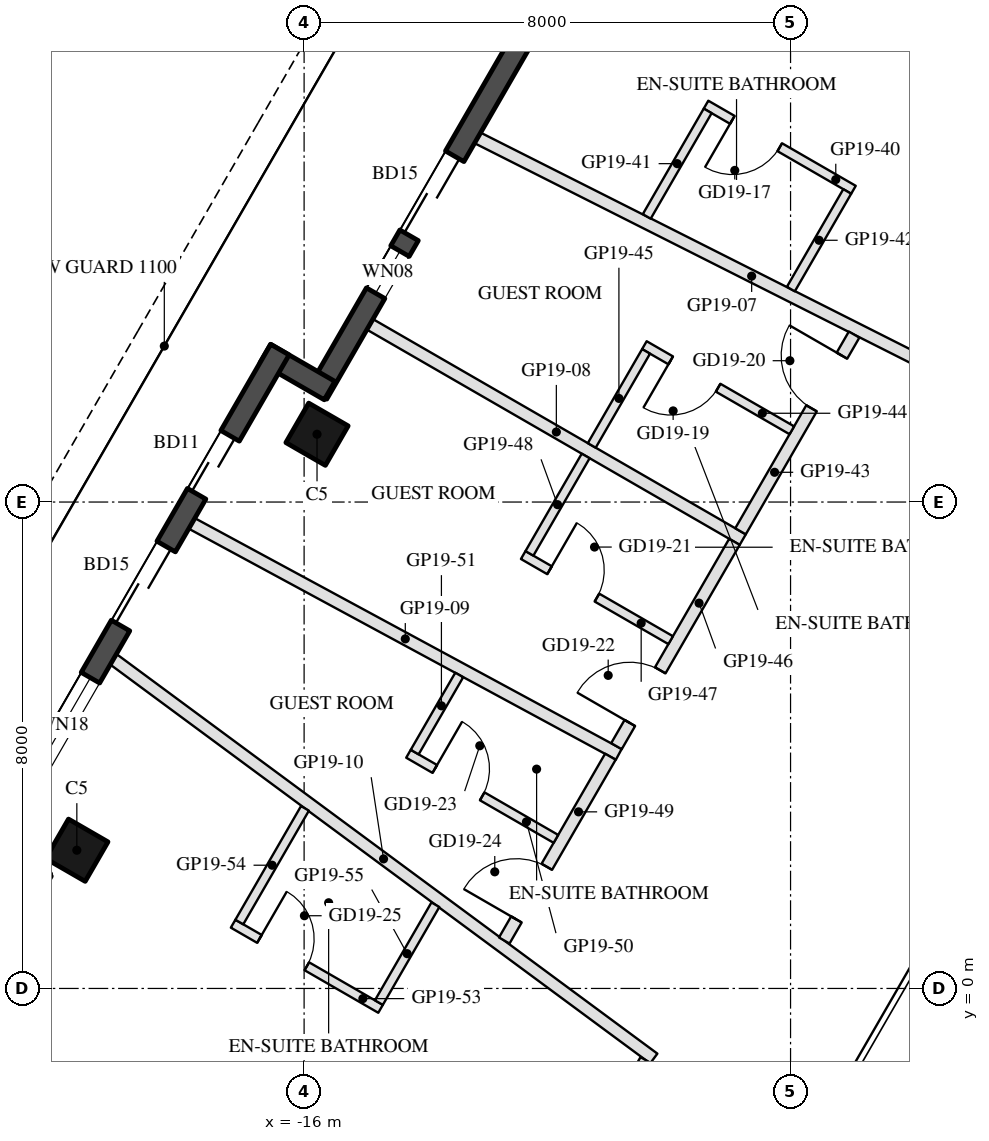
"""IFC4 building model, lengths in metres.
Left out: names, types, materials, properties, quantities, classifications, styles, units other than length and angle.
Written with IfcOpenShell. Run it as: python <this file> out.ifc"""

import sys

from ifc_helpers import new_model, si_unit, direction, frame, frame_2d, origin, origin_2d, place, context, subcontext, project, spatial, rectangle, hollow_rectangle, extrude, element, fill, save


model = new_model("IFC4")
c1 = context("Model", 3, precision=1e-05, world=origin(), true_north=direction((0.0, 1.0)))
c2 = subcontext(c1, "Body", "Model", "MODEL_VIEW")
j1 = project(units=[si_unit("LENGTHUNIT", "METRE"), si_unit("PLANEANGLEUNIT", "RADIAN")], contexts=[c1])
p1 = place(None, origin())
s1 = spatial("IfcSite", under=j1, at=p1, CompositionType="ELEMENT")
p2 = place(p1, origin())
s2 = spatial("IfcBuilding", under=s1, at=p2, CompositionType="ELEMENT")
p3 = place(p2, frame((0.0, 0.0, 202.1)))
s3 = spatial("IfcBuildingStorey", under=s2, at=p3, CompositionType="ELEMENT", Elevation=202.1)
for number, where, z_axis, x_axis in (
    (1, (-15.788, 9.115, 0.0), (0.0, 0.0, 1.0), (0.5, 0.866, 0.0)),
    (2, (-19.738, 2.273, 0.0), (0.0, 0.0, 1.0), (0.5, 0.866, 0.0)),
):
    element("IfcColumn", number, at=place(p3, frame(where, z_axis=z_axis, x_axis=x_axis)), inside=s3, PredefinedType="COLUMN", context=c2, shape_type="SweptSolid", body=[
        extrude(hollow_rectangle(XDim=0.75, YDim=0.75, WallThickness=0.035, at=origin_2d()), origin(), (0.0, 0.0, 1.0), 3.7),
    ])
p4 = place(p3, frame((-13.413, 16.029, 0.0), z_axis=(0.0, 0.0, 1.0), x_axis=(0.866005645448, -0.500034220881, 0.0)))
e3 = element("IfcWall", 3, at=p4, inside=s3, PredefinedType="SOLIDWALL", context=c2, shape_type="SweptSolid", body=[
    extrude(rectangle(XDim=1.22, YDim=0.35, at=frame_2d((0.61, 0.0))), origin(), (0.0, 0.0, 1.0), 3.55),
])
p5 = place(p3, frame((-12.409, 15.617, 0.0), z_axis=(0.0, 0.0, 1.0), x_axis=(-0.500003597184, -0.866023326939, 0.0)))
e4 = element("IfcWall", 4, at=p5, inside=s3, PredefinedType="SOLIDWALL", context=c2, shape_type="SweptSolid", body=[
    extrude(rectangle(XDim=6.74, YDim=0.35, at=frame_2d((3.37, 0.0))), origin(), (0.0, 0.0, 1.0), 3.55),
])
p6 = place(p5, frame((2.229, 0.0, 0.0)))
e5 = element("IfcOpeningElement", 5, at=p6, cuts=e4, PredefinedType="OPENING", context=c2, shape_type="SweptSolid", body=[
    extrude(rectangle(XDim=1.5, YDim=2.4, at=frame_2d((0.75, 1.2))), frame((0.0, 0.185, 0.0), z_axis=(0.0, -1.0, 0.0), x_axis=(1.0, 0.0, 0.0)), (0.0, 0.0, 1.0), 0.37),
])
p7 = place(p5, frame((4.029, 0.0, 0.3)))
e6 = element("IfcOpeningElement", 6, at=p7, cuts=e4, PredefinedType="OPENING", context=c2, shape_type="SweptSolid", body=[
    extrude(rectangle(XDim=0.8, YDim=2.65, at=frame_2d((0.4, 1.325))), frame((0.0, 0.185, 0.0), z_axis=(0.0, -1.0, 0.0), x_axis=(1.0, 0.0, 0.0)), (0.0, 0.0, 1.0), 0.37),
])
p8 = place(p3, frame((-15.581, 9.833, 0.0), z_axis=(0.0, 0.0, 1.0), x_axis=(-0.866055662726, 0.499947586314, 0.0)))
e7 = element("IfcWall", 7, at=p8, inside=s3, PredefinedType="SOLIDWALL", context=c2, shape_type="SweptSolid", body=[
    extrude(rectangle(XDim=1.22, YDim=0.35, at=frame_2d((0.61, 0.0))), origin(), (0.0, 0.0, 1.0), 3.55),
])
p9 = place(p3, frame((-16.398, 10.507, 0.0), z_axis=(0.0, 0.0, 1.0), x_axis=(-0.499999142773, -0.866025898704, 0.0)))
e8 = element("IfcWall", 8, at=p9, inside=s3, PredefinedType="SOLIDWALL", context=c2, shape_type="SweptSolid", body=[
    extrude(rectangle(XDim=9.7, YDim=0.35, at=frame_2d((4.85, 0.0))), origin(), (0.0, 0.0, 1.0), 3.55),
])
p10 = place(p9, frame((1.638, 0.0, 0.0)))
e9 = element("IfcOpeningElement", 9, at=p10, cuts=e8, PredefinedType="OPENING", context=c2, shape_type="SweptSolid", body=[
    extrude(rectangle(XDim=1.1, YDim=2.4, at=frame_2d((0.55, 1.2))), frame((0.0, 0.185, 0.0), z_axis=(0.0, -1.0, 0.0), x_axis=(1.0, 0.0, 0.0)), (0.0, 0.0, 1.0), 0.37),
])
p11 = place(p9, frame((3.74, 0.0, 0.0)))
e10 = element("IfcOpeningElement", 10, at=p11, cuts=e8, PredefinedType="OPENING", context=c2, shape_type="SweptSolid", body=[
    extrude(rectangle(XDim=1.5, YDim=2.4, at=frame_2d((0.75, 1.2))), frame((0.0, 0.185, 0.0), z_axis=(0.0, -1.0, 0.0), x_axis=(1.0, 0.0, 0.0)), (0.0, 0.0, 1.0), 0.37),
])
p12 = place(p9, frame((6.231, 0.0, 0.3)))
e11 = element("IfcOpeningElement", 11, at=p12, cuts=e8, PredefinedType="OPENING", context=c2, shape_type="SweptSolid", body=[
    extrude(rectangle(XDim=1.8, YDim=2.65, at=frame_2d((0.9, 1.325))), frame((0.0, 0.185, 0.0), z_axis=(0.0, -1.0, 0.0), x_axis=(1.0, 0.0, 0.0)), (0.0, 0.0, 1.0), 0.37),
])
p13 = place(p3, frame((-13.147, 13.989, 0.0), z_axis=(0.0, 0.0, 1.0), x_axis=(0.892898572595, -0.450257858408, 0.0)))
e12 = element("IfcWall", 12, at=p13, inside=s3, PredefinedType="PARTITIONING", context=c2, shape_type="SweptSolid", body=[
    extrude(rectangle(XDim=10.096, YDim=0.2, at=frame_2d((5.048, 0.0))), origin(), (0.0, 0.0, 1.0), 3.06),
])
p14 = place(p3, frame((-14.917, 10.922, 0.0), z_axis=(0.0, 0.0, 1.0), x_axis=(0.866019052629, -0.500011000363, 0.0)))
e13 = element("IfcWall", 13, at=p14, inside=s3, PredefinedType="PARTITIONING", context=c2, shape_type="SweptSolid", body=[
    extrude(rectangle(XDim=7.08, YDim=0.2, at=frame_2d((3.54, 0.0))), origin(), (0.0, 0.0, 1.0), 3.06),
])
p15 = place(p3, frame((-17.847, 7.648, 0.0), z_axis=(0.0, 0.0, 1.0), x_axis=(0.879604495132, -0.475705720109, 0.0)))
e14 = element("IfcWall", 14, at=p15, inside=s3, PredefinedType="PARTITIONING", context=c2, shape_type="SweptSolid", body=[
    extrude(rectangle(XDim=7.983, YDim=0.2, at=frame_2d((3.992, 0.0))), origin(), (0.0, 0.0, 1.0), 3.06),
])
p16 = place(p3, frame((-19.137, 5.414, 0.0), z_axis=(0.0, 0.0, 1.0), x_axis=(0.804306065669, -0.594215241077, 0.0)))
e15 = element("IfcWall", 15, at=p16, inside=s3, PredefinedType="PARTITIONING", context=c2, shape_type="SweptSolid", body=[
    extrude(rectangle(XDim=11.05, YDim=0.2, at=frame_2d((5.525, 0.0))), origin(), (0.0, 0.0, 1.0), 3.06),
])
p17 = place(p3, frame((-6.965, 13.136, 0.0), z_axis=(0.0, 0.0, 1.0), x_axis=(-0.866034573852, 0.49998411664, 0.0)))
e16 = element("IfcWall", 16, at=p17, inside=s3, PredefinedType="PARTITIONING", context=c2, shape_type="SweptSolid", body=[
    extrude(rectangle(XDim=2.8, YDim=0.15, at=frame_2d((1.4, 0.0))), origin(), (0.0, 0.0, 1.0), 2.95),
])
p18 = place(p17, frame((1.4, 0.0, 0.0)))
e17 = element("IfcOpeningElement", 17, at=p18, cuts=e16, PredefinedType="OPENING", context=c2, shape_type="SweptSolid", body=[
    extrude(rectangle(XDim=0.9, YDim=2.1, at=frame_2d((0.45, 1.05))), frame((0.0, 0.085, 0.0), z_axis=(0.0, -1.0, 0.0), x_axis=(1.0, 0.0, 0.0)), (0.0, 0.0, 1.0), 0.17),
])
p19 = place(p3, frame((-9.363, 14.433, 0.0), z_axis=(0.0, 0.0, 1.0), x_axis=(-0.500056363668, -0.86599285976, 0.0)))
e18 = element("IfcWall", 18, at=p19, inside=s3, PredefinedType="PARTITIONING", context=c2, shape_type="SweptSolid", body=[
    extrude(rectangle(XDim=2.004, YDim=0.15, at=frame_2d((1.002, 0.0))), origin(), (0.0, 0.0, 1.0), 2.95),
])
p20 = place(p3, frame((-7.068, 13.108, 0.0), z_axis=(0.0, 0.0, 1.0), x_axis=(-0.4999770169, -0.866038672677, 0.0)))
e19 = element("IfcWall", 19, at=p20, inside=s3, PredefinedType="PARTITIONING", context=c2, shape_type="SweptSolid", body=[
    extrude(rectangle(XDim=1.854, YDim=0.15, at=frame_2d((0.927, 0.0))), origin(), (0.0, 0.0, 1.0), 2.95),
])
p21 = place(p3, frame((-8.823, 7.519, 0.0), z_axis=(0.0, 0.0, 1.0), x_axis=(0.500026055714, 0.866010359988, 0.0)))
e20 = element("IfcWall", 20, at=p21, inside=s3, PredefinedType="PARTITIONING", context=c2, shape_type="SweptSolid", body=[
    extrude(rectangle(XDim=3.736, YDim=0.2, at=frame_2d((1.868, 0.0))), origin(), (0.0, 0.0, 1.0), 2.95),
])
p22 = place(p21, frame((2.336, 0.0, 0.0)))
e21 = element("IfcOpeningElement", 21, at=p22, cuts=e20, PredefinedType="OPENING", context=c2, shape_type="SweptSolid", body=[
    extrude(rectangle(XDim=1.0, YDim=2.1, at=frame_2d((0.5, 1.05))), frame((0.0, 0.11, 0.0), z_axis=(0.0, -1.0, 0.0), x_axis=(1.0, 0.0, 0.0)), (0.0, 0.0, 1.0), 0.22),
])
p23 = place(p3, frame((-7.979, 9.18, 0.0), z_axis=(0.0, 0.0, 1.0), x_axis=(-0.866034573852, 0.49998411664, 0.0)))
e22 = element("IfcWall", 22, at=p23, inside=s3, PredefinedType="PARTITIONING", context=c2, shape_type="SweptSolid", body=[
    extrude(rectangle(XDim=2.8, YDim=0.15, at=frame_2d((1.4, 0.0))), origin(), (0.0, 0.0, 1.0), 2.95),
])
p24 = place(p23, frame((1.4, 0.0, 0.0)))
e23 = element("IfcOpeningElement", 23, at=p24, cuts=e22, PredefinedType="OPENING", context=c2, shape_type="SweptSolid", body=[
    extrude(rectangle(XDim=0.9, YDim=2.1, at=frame_2d((0.45, 1.05))), frame((0.0, 0.085, 0.0), z_axis=(0.0, -1.0, 0.0), x_axis=(1.0, 0.0, 0.0)), (0.0, 0.0, 1.0), 0.17),
])
p25 = place(p3, frame((-10.376, 10.478, 0.0), z_axis=(0.0, 0.0, 1.0), x_axis=(-0.500109033781, -0.865962443949, 0.0)))
e24 = element("IfcWall", 24, at=p25, inside=s3, PredefinedType="PARTITIONING", context=c2, shape_type="SweptSolid", body=[
    extrude(rectangle(XDim=1.786, YDim=0.15, at=frame_2d((0.893, 0.0))), origin(), (0.0, 0.0, 1.0), 2.95),
])
p26 = place(p3, frame((-10.863, 3.985, 0.0), z_axis=(0.0, 0.0, 1.0), x_axis=(0.500009256921, 0.866020059232, 0.0)))
e25 = element("IfcWall", 25, at=p26, inside=s3, PredefinedType="PARTITIONING", context=c2, shape_type="SweptSolid", body=[
    extrude(rectangle(XDim=3.881, YDim=0.2, at=frame_2d((1.94, 0.0))), origin(), (0.0, 0.0, 1.0), 2.95),
])
p27 = place(p26, frame((0.44, 0.0, 0.0)))
e26 = element("IfcOpeningElement", 26, at=p27, cuts=e25, PredefinedType="OPENING", context=c2, shape_type="SweptSolid", body=[
    extrude(rectangle(XDim=1.0, YDim=2.1, at=frame_2d((0.5, 1.05))), frame((0.0, 0.11, 0.0), z_axis=(0.0, -1.0, 0.0), x_axis=(1.0, 0.0, 0.0)), (0.0, 0.0, 1.0), 0.22),
])
p28 = place(p3, frame((-12.397, 7.128, 0.0), z_axis=(0.0, 0.0, 1.0), x_axis=(0.866018616679, -0.500011755427, 0.0)))
e27 = element("IfcWall", 27, at=p28, inside=s3, PredefinedType="PARTITIONING", context=c2, shape_type="SweptSolid", body=[
    extrude(rectangle(XDim=2.8, YDim=0.15, at=frame_2d((1.4, 0.0))), origin(), (0.0, 0.0, 1.0), 2.95),
])
p29 = place(p28, frame((0.5, 0.0, 0.0)))
e28 = element("IfcOpeningElement", 28, at=p29, cuts=e27, PredefinedType="OPENING", context=c2, shape_type="SweptSolid", body=[
    extrude(rectangle(XDim=0.9, YDim=2.1, at=frame_2d((0.45, 1.05))), frame((0.0, 0.085, 0.0), z_axis=(0.0, -1.0, 0.0), x_axis=(1.0, 0.0, 0.0)), (0.0, 0.0, 1.0), 0.17),
])
p30 = place(p3, frame((-11.369, 8.758, 0.0), z_axis=(0.0, 0.0, 1.0), x_axis=(-0.500042316284, -0.866000971088, 0.0)))
e29 = element("IfcWall", 29, at=p30, inside=s3, PredefinedType="PARTITIONING", context=c2, shape_type="SweptSolid", body=[
    extrude(rectangle(XDim=1.85, YDim=0.15, at=frame_2d((0.925, 0.0))), origin(), (0.0, 0.0, 1.0), 2.95),
])
p31 = place(p3, frame((-12.708, 0.789, 0.0), z_axis=(0.0, 0.0, 1.0), x_axis=(0.49999088835, 0.866030664334, 0.0)))
e30 = element("IfcWall", 30, at=p31, inside=s3, PredefinedType="PARTITIONING", context=c2, shape_type="SweptSolid", body=[
    extrude(rectangle(XDim=3.49, YDim=0.2, at=frame_2d((1.745, 0.0))), origin(), (0.0, 0.0, 1.0), 2.95),
])
p32 = place(p31, frame((0.4, 0.0, 0.0)))
e31 = element("IfcOpeningElement", 31, at=p32, cuts=e30, PredefinedType="OPENING", context=c2, shape_type="SweptSolid", body=[
    extrude(rectangle(XDim=1.0, YDim=2.1, at=frame_2d((0.5, 1.05))), frame((0.0, 0.11, 0.0), z_axis=(0.0, -1.0, 0.0), x_axis=(1.0, 0.0, 0.0)), (0.0, 0.0, 1.0), 0.22),
])
p33 = place(p3, frame((-14.284, 3.86, 0.0), z_axis=(0.0, 0.0, 1.0), x_axis=(0.865996816683, -0.500049511043, 0.0)))
e32 = element("IfcWall", 32, at=p33, inside=s3, PredefinedType="PARTITIONING", context=c2, shape_type="SweptSolid", body=[
    extrude(rectangle(XDim=2.8, YDim=0.15, at=frame_2d((1.4, 0.0))), origin(), (0.0, 0.0, 1.0), 2.95),
])
p34 = place(p33, frame((0.5, 0.0, 0.0)))
e33 = element("IfcOpeningElement", 33, at=p34, cuts=e32, PredefinedType="OPENING", context=c2, shape_type="SweptSolid", body=[
    extrude(rectangle(XDim=0.9, YDim=2.1, at=frame_2d((0.45, 1.05))), frame((0.0, 0.085, 0.0), z_axis=(0.0, -1.0, 0.0), x_axis=(1.0, 0.0, 0.0)), (0.0, 0.0, 1.0), 0.17),
])
p35 = place(p3, frame((-13.449, 5.156, 0.0), z_axis=(0.0, 0.0, 1.0), x_axis=(-0.499958157915, -0.866049559976, 0.0)))
e34 = element("IfcWall", 34, at=p35, inside=s3, PredefinedType="PARTITIONING", context=c2, shape_type="SweptSolid", body=[
    extrude(rectangle(XDim=1.465, YDim=0.15, at=frame_2d((0.732, 0.0))), origin(), (0.0, 0.0, 1.0), 3.55),
])
p36 = place(p3, frame((-12.269, -4.45, 0.0), z_axis=(0.0, 0.0, 1.0), x_axis=(0.500019063067, 0.866014397438, 0.0)))
e35 = element("IfcWall", 35, at=p36, inside=s3, PredefinedType="PARTITIONING", context=c2, shape_type="SweptSolid", body=[
    extrude(rectangle(XDim=3.776, YDim=0.2, at=frame_2d((1.888, 0.0))), origin(), (0.0, 0.0, 1.0), 2.95),
])
p37 = place(p36, frame((1.388, 0.0, 0.0)))
e36 = element("IfcOpeningElement", 36, at=p37, cuts=e35, PredefinedType="OPENING", context=c2, shape_type="SweptSolid", body=[
    extrude(rectangle(XDim=1.0, YDim=2.1, at=frame_2d((0.5, 1.05))), frame((0.0, 0.11, 0.0), z_axis=(0.0, -1.0, 0.0), x_axis=(1.0, 0.0, 0.0)), (0.0, 0.0, 1.0), 0.22),
])
p38 = place(p3, frame((-17.167, 1.065, 0.0), z_axis=(0.0, 0.0, 1.0), x_axis=(0.866034573852, -0.49998411664, 0.0)))
e37 = element("IfcWall", 37, at=p38, inside=s3, PredefinedType="PARTITIONING", context=c2, shape_type="SweptSolid", body=[
    extrude(rectangle(XDim=2.8, YDim=0.15, at=frame_2d((1.4, 0.0))), origin(), (0.0, 0.0, 1.0), 3.55),
])
p39 = place(p38, frame((0.5, 0.0, 0.0)))
e38 = element("IfcOpeningElement", 38, at=p39, cuts=e37, PredefinedType="OPENING", context=c2, shape_type="SweptSolid", body=[
    extrude(rectangle(XDim=0.9, YDim=2.1, at=frame_2d((0.45, 1.05))), frame((0.0, 0.085, 0.0), z_axis=(0.0, -1.0, 0.0), x_axis=(1.0, 0.0, 0.0)), (0.0, 0.0, 1.0), 0.17),
])
p40 = place(p3, frame((-15.986, 2.961, 0.0), z_axis=(0.0, 0.0, 1.0), x_axis=(-0.499983569942, -0.866034889475, 0.0)))
e39 = element("IfcWall", 39, at=p40, inside=s3, PredefinedType="PARTITIONING", context=c2, shape_type="SweptSolid", body=[
    extrude(rectangle(XDim=2.158, YDim=0.15, at=frame_2d((1.079, 0.0))), origin(), (0.0, 0.0, 1.0), 3.55),
])
p41 = place(p3, frame((-13.841, 1.377, 0.0), z_axis=(0.0, 0.0, 1.0), x_axis=(-0.500109064886, -0.865962425986, 0.0)))
e40 = element("IfcWall", 40, at=p41, inside=s3, PredefinedType="PARTITIONING", context=c2, shape_type="SweptSolid", body=[
    extrude(rectangle(XDim=1.858, YDim=0.15, at=frame_2d((0.929, 0.0))), origin(), (0.0, 0.0, 1.0), 3.55),
])
p42 = place(p6, frame((1.5, 0.0, 0.0), z_axis=(0.0, 0.0, 1.0), x_axis=(-1.0, 0.0, 0.0)))
e41 = element("IfcDoor", 41, at=p42, inside=s3, OperationType="SLIDING_TO_LEFT", PredefinedType="DOOR", context=c2, shape_type="SweptSolid", body=[
    extrude(rectangle(XDim=1.5, YDim=2.4, at=frame_2d((0.75, 1.2))), frame((0.0, 0.025, 0.0), z_axis=(0.0, -1.0, 0.0), x_axis=(1.0, 0.0, 0.0)), (0.0, 0.0, 1.0), 0.05),
])
fill(e5, e41)
p43 = place(p7, origin())
e42 = element("IfcWindow", 42, at=p43, inside=s3, PartitioningType="SINGLE_PANEL", PredefinedType="WINDOW", context=c2, shape_type="SweptSolid", body=[
    extrude(rectangle(XDim=0.8, YDim=2.65, at=frame_2d((0.4, 1.325))), frame((0.0, 0.03, 0.0), z_axis=(0.0, -1.0, 0.0), x_axis=(1.0, 0.0, 0.0)), (0.0, 0.0, 1.0), 0.06),
])
fill(e6, e42)
p44 = place(p10, frame((1.1, 0.0, 0.0), z_axis=(0.0, 0.0, 1.0), x_axis=(-1.0, 0.0, 0.0)))
e43 = element("IfcDoor", 43, at=p44, inside=s3, OperationType="SLIDING_TO_LEFT", PredefinedType="DOOR", context=c2, shape_type="SweptSolid", body=[
    extrude(rectangle(XDim=1.1, YDim=2.4, at=frame_2d((0.55, 1.2))), frame((0.0, 0.025, 0.0), z_axis=(0.0, -1.0, 0.0), x_axis=(1.0, 0.0, 0.0)), (0.0, 0.0, 1.0), 0.05),
])
fill(e9, e43)
p45 = place(p11, frame((1.5, 0.0, 0.0), z_axis=(0.0, 0.0, 1.0), x_axis=(-1.0, 0.0, 0.0)))
e44 = element("IfcDoor", 44, at=p45, inside=s3, OperationType="SLIDING_TO_LEFT", PredefinedType="DOOR", context=c2, shape_type="SweptSolid", body=[
    extrude(rectangle(XDim=1.5, YDim=2.4, at=frame_2d((0.75, 1.2))), frame((0.0, 0.025, 0.0), z_axis=(0.0, -1.0, 0.0), x_axis=(1.0, 0.0, 0.0)), (0.0, 0.0, 1.0), 0.05),
])
fill(e10, e44)
p46 = place(p12, origin())
e45 = element("IfcWindow", 45, at=p46, inside=s3, PartitioningType="SINGLE_PANEL", PredefinedType="WINDOW", context=c2, shape_type="SweptSolid", body=[
    extrude(rectangle(XDim=1.8, YDim=2.65, at=frame_2d((0.9, 1.325))), frame((0.0, 0.03, 0.0), z_axis=(0.0, -1.0, 0.0), x_axis=(1.0, 0.0, 0.0)), (0.0, 0.0, 1.0), 0.06),
])
fill(e11, e45)
p47 = place(p18, origin())
e46 = element("IfcDoor", 46, at=p47, inside=s3, OperationType="SINGLE_SWING_RIGHT", PredefinedType="DOOR", context=c2, shape_type="SweptSolid", body=[
    extrude(rectangle(XDim=0.9, YDim=2.1, at=frame_2d((0.45, 1.05))), frame((0.0, 0.025, 0.0), z_axis=(0.0, -1.0, 0.0), x_axis=(1.0, 0.0, 0.0)), (0.0, 0.0, 1.0), 0.05),
])
fill(e17, e46)
p48 = place(p24, origin())
e47 = element("IfcDoor", 47, at=p48, inside=s3, OperationType="SINGLE_SWING_RIGHT", PredefinedType="DOOR", context=c2, shape_type="SweptSolid", body=[
    extrude(rectangle(XDim=0.9, YDim=2.1, at=frame_2d((0.45, 1.05))), frame((0.0, 0.025, 0.0), z_axis=(0.0, -1.0, 0.0), x_axis=(1.0, 0.0, 0.0)), (0.0, 0.0, 1.0), 0.05),
])
fill(e23, e47)
p49 = place(p22, origin())
e48 = element("IfcDoor", 48, at=p49, inside=s3, OperationType="SINGLE_SWING_RIGHT", PredefinedType="DOOR", context=c2, shape_type="SweptSolid", body=[
    extrude(rectangle(XDim=1.0, YDim=2.1, at=frame_2d((0.5, 1.05))), frame((0.0, 0.025, 0.0), z_axis=(0.0, -1.0, 0.0), x_axis=(1.0, 0.0, 0.0)), (0.0, 0.0, 1.0), 0.05),
])
fill(e21, e48)
p50 = place(p29, origin())
e49 = element("IfcDoor", 49, at=p50, inside=s3, OperationType="SINGLE_SWING_LEFT", PredefinedType="DOOR", context=c2, shape_type="SweptSolid", body=[
    extrude(rectangle(XDim=0.9, YDim=2.1, at=frame_2d((0.45, 1.05))), frame((0.0, 0.025, 0.0), z_axis=(0.0, -1.0, 0.0), x_axis=(1.0, 0.0, 0.0)), (0.0, 0.0, 1.0), 0.05),
])
fill(e28, e49)
p51 = place(p27, origin())
e50 = element("IfcDoor", 50, at=p51, inside=s3, OperationType="SINGLE_SWING_LEFT", PredefinedType="DOOR", context=c2, shape_type="SweptSolid", body=[
    extrude(rectangle(XDim=1.0, YDim=2.1, at=frame_2d((0.5, 1.05))), frame((0.0, 0.025, 0.0), z_axis=(0.0, -1.0, 0.0), x_axis=(1.0, 0.0, 0.0)), (0.0, 0.0, 1.0), 0.05),
])
fill(e26, e50)
p52 = place(p34, origin())
e51 = element("IfcDoor", 51, at=p52, inside=s3, OperationType="SINGLE_SWING_LEFT", PredefinedType="DOOR", context=c2, shape_type="SweptSolid", body=[
    extrude(rectangle(XDim=0.9, YDim=2.1, at=frame_2d((0.45, 1.05))), frame((0.0, 0.025, 0.0), z_axis=(0.0, -1.0, 0.0), x_axis=(1.0, 0.0, 0.0)), (0.0, 0.0, 1.0), 0.05),
])
fill(e33, e51)
p53 = place(p32, origin())
e52 = element("IfcDoor", 52, at=p53, inside=s3, OperationType="SINGLE_SWING_LEFT", PredefinedType="DOOR", context=c2, shape_type="SweptSolid", body=[
    extrude(rectangle(XDim=1.0, YDim=2.1, at=frame_2d((0.5, 1.05))), frame((0.0, 0.025, 0.0), z_axis=(0.0, -1.0, 0.0), x_axis=(1.0, 0.0, 0.0)), (0.0, 0.0, 1.0), 0.05),
])
fill(e31, e52)
p54 = place(p39, origin())
e53 = element("IfcDoor", 53, at=p54, inside=s3, OperationType="SINGLE_SWING_LEFT", PredefinedType="DOOR", context=c2, shape_type="SweptSolid", body=[
    extrude(rectangle(XDim=0.9, YDim=2.1, at=frame_2d((0.45, 1.05))), frame((0.0, 0.025, 0.0), z_axis=(0.0, -1.0, 0.0), x_axis=(1.0, 0.0, 0.0)), (0.0, 0.0, 1.0), 0.05),
])
fill(e38, e53)
save(model, sys.argv[1])
